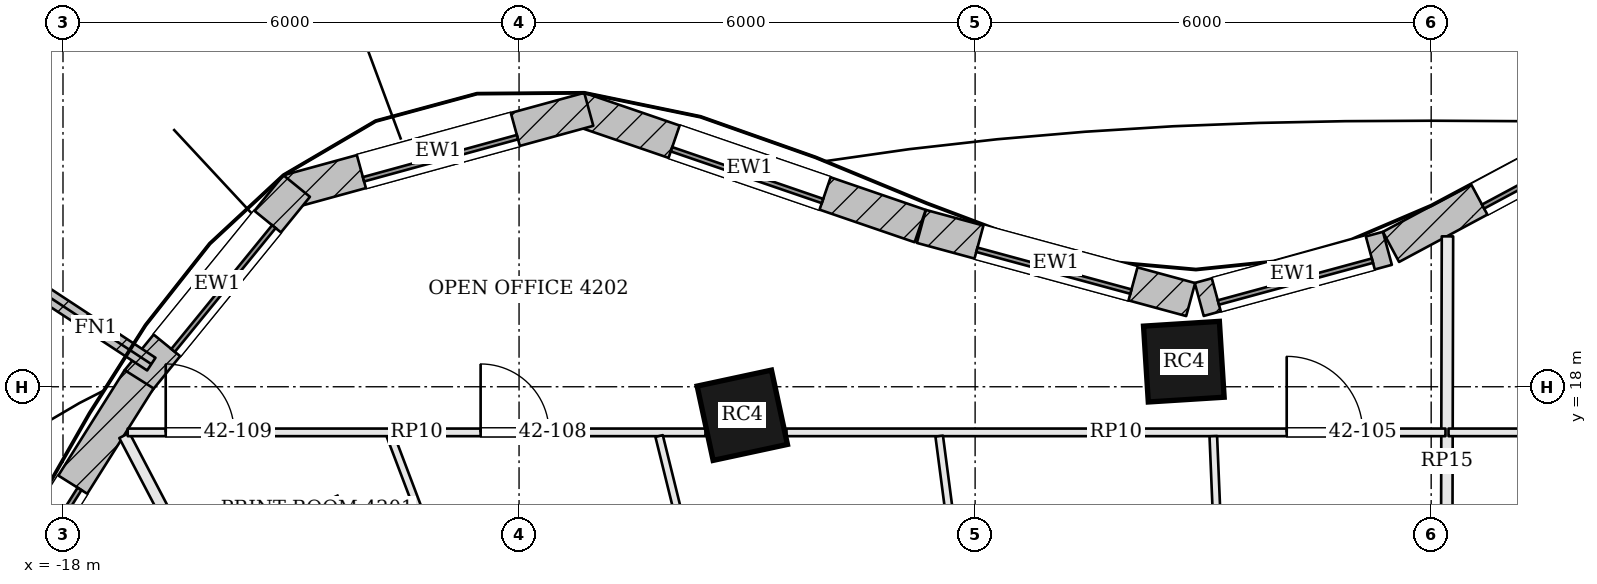
"""IFC4 building model, lengths in metres.
Left out: names, types, materials, properties, quantities, classifications, styles, units other than length and angle.
Written with IfcOpenShell. Run it as: python <this file> out.ifc"""

import sys

from ifc_helpers import new_model, si_unit, direction, frame, frame_2d, origin, origin_2d, place, context, subcontext, project, spatial, rectangle, extrude, element, fill, save


model = new_model("IFC4")
c1 = context("Model", 3, precision=1e-05, world=origin(), true_north=direction((0.0, 1.0)))
c2 = subcontext(c1, "Body", "Model", "MODEL_VIEW")
j1 = project(units=[si_unit("LENGTHUNIT", "METRE"), si_unit("PLANEANGLEUNIT", "RADIAN")], contexts=[c1])
p1 = place(None, origin())
s1 = spatial("IfcSite", under=j1, at=p1, CompositionType="ELEMENT")
p2 = place(p1, origin())
s2 = spatial("IfcBuilding", under=s1, at=p2, CompositionType="ELEMENT")
p3 = place(p2, frame((0.0, 0.0, 174.0)))
s3 = spatial("IfcBuildingStorey", under=s2, at=p3, CompositionType="ELEMENT", Elevation=174.0)
for number, where, z_axis, x_axis in (
    (1, (-3.254, 18.33, -0.7), (0.0, 0.0, 1.0), (-0.998, -0.063, 0.0)),
    (2, (-9.063, 17.625, -0.7), (0.0, 0.0, 1.0), (-0.978, -0.21, 0.0)),
    (3, (-14.643, 15.881, -0.7), (0.0, 0.0, 1.0), (-0.909, -0.417, 0.0)),
):
    element("IfcColumn", number, at=place(p3, frame(where, z_axis=z_axis, x_axis=x_axis)), inside=s3, PredefinedType="COLUMN", context=c2, shape_type="SweptSolid", body=[
        extrude(rectangle(XDim=1.0, YDim=1.0, at=origin_2d()), origin(), (0.0, 0.0, 1.0), 4.6),
    ])
p4 = place(p3, frame((3.646, 22.079, 0.0), z_axis=(0.0, 0.0, 1.0), x_axis=(-0.881279133897, -0.472596115259, 0.0)))
e4 = element("IfcWall", 4, at=p4, inside=s3, PredefinedType="SOLIDWALL", context=c2, shape_type="SweptSolid", body=[
    extrude(rectangle(XDim=4.737, YDim=0.45, at=frame_2d((2.368, 0.0))), origin(), (0.0, 0.0, 1.0), 3.7),
])
p5 = place(p4, frame((1.318, 0.0, 0.9)))
e5 = element("IfcOpeningElement", 5, at=p5, cuts=e4, PredefinedType="OPENING", context=c2, shape_type="SweptSolid", body=[
    extrude(rectangle(XDim=2.1, YDim=2.3, at=frame_2d((1.05, 1.15))), frame((0.0, 0.235, 0.0), z_axis=(0.0, -1.0, 0.0), x_axis=(1.0, 0.0, 0.0)), (0.0, 0.0, 1.0), 0.47),
])
p6 = place(p3, frame((-0.576, 19.821, 0.0), z_axis=(0.0, 0.0, 1.0), x_axis=(-0.965009398019, -0.262215296532, 0.0)))
e6 = element("IfcWall", 6, at=p6, inside=s3, PredefinedType="SOLIDWALL", context=c2, shape_type="SweptSolid", body=[
    extrude(rectangle(XDim=2.565, YDim=0.45, at=frame_2d((1.283, 0.0))), origin(), (0.0, 0.0, 1.0), 3.7),
])
p7 = place(p6, frame((0.233, 0.0, 0.9)))
e7 = element("IfcOpeningElement", 7, at=p7, cuts=e6, PredefinedType="OPENING", context=c2, shape_type="SweptSolid", body=[
    extrude(rectangle(XDim=2.1, YDim=2.3, at=frame_2d((1.05, 1.15))), frame((0.0, 0.235, 0.0), z_axis=(0.0, -1.0, 0.0), x_axis=(1.0, 0.0, 0.0)), (0.0, 0.0, 1.0), 0.47),
])
p8 = place(p3, frame((-3.164, 19.147, 0.0), z_axis=(0.0, 0.0, 1.0), x_axis=(-0.965039479998, 0.262104563191, 0.0)))
e8 = element("IfcWall", 8, at=p8, inside=s3, PredefinedType="SOLIDWALL", context=c2, shape_type="SweptSolid", body=[
    extrude(rectangle(XDim=3.672, YDim=0.45, at=frame_2d((1.836, 0.0))), origin(), (0.0, 0.0, 1.0), 3.7),
])
p9 = place(p8, frame((0.786, 0.0, 0.9)))
e9 = element("IfcOpeningElement", 9, at=p9, cuts=e8, PredefinedType="OPENING", context=c2, shape_type="SweptSolid", body=[
    extrude(rectangle(XDim=2.1, YDim=2.3, at=frame_2d((1.05, 1.15))), frame((0.0, 0.235, 0.0), z_axis=(0.0, -1.0, 0.0), x_axis=(1.0, 0.0, 0.0)), (0.0, 0.0, 1.0), 0.47),
])
p10 = place(p3, frame((-6.723, 20.114, 0.0), z_axis=(0.0, 0.0, 1.0), x_axis=(-0.945947299026, 0.324320377815, 0.0)))
e10 = element("IfcWall", 10, at=p10, inside=s3, PredefinedType="SOLIDWALL", context=c2, shape_type="SweptSolid", body=[
    extrude(rectangle(XDim=4.745, YDim=0.45, at=frame_2d((2.372, 0.0))), origin(), (0.0, 0.0, 1.0), 3.7),
])
p11 = place(p10, frame((1.322, 0.0, 0.9)))
e11 = element("IfcOpeningElement", 11, at=p11, cuts=e10, PredefinedType="OPENING", context=c2, shape_type="SweptSolid", body=[
    extrude(rectangle(XDim=2.1, YDim=2.3, at=frame_2d((1.05, 1.15))), frame((0.0, 0.235, 0.0), z_axis=(0.0, -1.0, 0.0), x_axis=(1.0, 0.0, 0.0)), (0.0, 0.0, 1.0), 0.47),
])
p12 = place(p3, frame((-11.083, 21.65, 0.0), z_axis=(0.0, 0.0, 1.0), x_axis=(-0.964483204983, -0.264144179011, 0.0)))
e12 = element("IfcWall", 12, at=p12, inside=s3, PredefinedType="SOLIDWALL", context=c2, shape_type="SweptSolid", body=[
    extrude(rectangle(XDim=4.104, YDim=0.45, at=frame_2d((2.052, 0.0))), origin(), (0.0, 0.0, 1.0), 3.7),
])
p13 = place(p12, frame((1.002, 0.0, 0.9)))
e13 = element("IfcOpeningElement", 13, at=p13, cuts=e12, PredefinedType="OPENING", context=c2, shape_type="SweptSolid", body=[
    extrude(rectangle(XDim=2.1, YDim=2.3, at=frame_2d((1.05, 1.15))), frame((0.0, 0.235, 0.0), z_axis=(0.0, -1.0, 0.0), x_axis=(1.0, 0.0, 0.0)), (0.0, 0.0, 1.0), 0.47),
])
p14 = place(p3, frame((-14.926, 20.641, 0.0), z_axis=(0.0, 0.0, 1.0), x_axis=(-0.631548074669, -0.775336720001, 0.0)))
e14 = element("IfcWall", 14, at=p14, inside=s3, PredefinedType="SOLIDWALL", context=c2, shape_type="SweptSolid", body=[
    extrude(rectangle(XDim=3.308, YDim=0.45, at=frame_2d((1.654, 0.0))), origin(), (0.0, 0.0, 1.0), 3.7),
])
p15 = place(p14, frame((0.604, 0.0, 0.9)))
e15 = element("IfcOpeningElement", 15, at=p15, cuts=e14, PredefinedType="OPENING", context=c2, shape_type="SweptSolid", body=[
    extrude(rectangle(XDim=2.1, YDim=2.3, at=frame_2d((1.05, 1.15))), frame((0.0, 0.235, 0.0), z_axis=(0.0, -1.0, 0.0), x_axis=(1.0, 0.0, 0.0)), (0.0, 0.0, 1.0), 0.47),
])
p16 = place(p3, frame((-16.998, 18.099, 0.0), z_axis=(0.0, 0.0, 1.0), x_axis=(-0.532745661304, -0.846275404559, 0.0)))
e16 = element("IfcWall", 16, at=p16, inside=s3, PredefinedType="SOLIDWALL", context=c2, shape_type="SweptSolid", body=[
    extrude(rectangle(XDim=5.076, YDim=0.45, at=frame_2d((2.538, 0.0))), origin(), (0.0, 0.0, 1.0), 3.7),
])
p17 = place(p16, frame((1.638, 0.0, 0.9)))
e17 = element("IfcOpeningElement", 17, at=p17, cuts=e16, PredefinedType="OPENING", context=c2, shape_type="SweptSolid", body=[
    extrude(rectangle(XDim=1.8, YDim=2.3, at=frame_2d((0.9, 1.15))), frame((0.0, 0.235, 0.0), z_axis=(0.0, -1.0, 0.0), x_axis=(1.0, 0.0, 0.0)), (0.0, 0.0, 1.0), 0.47),
])
p18 = place(p3, frame((-16.838, 18.298, 0.0), z_axis=(0.0, 0.0, 1.0), x_axis=(-0.835871900419, 0.548924554097, 0.0)))
e18 = element("IfcWall", 18, at=p18, inside=s3, PredefinedType="SOLIDWALL", context=c2, shape_type="SweptSolid", body=[
    extrude(rectangle(XDim=1.75, YDim=0.2, at=frame_2d((0.875, 0.0))), origin(), (0.0, 0.0, 1.0), 3.7),
])
p19 = place(p3, frame((0.214, 19.979, 0.0), z_axis=(0.0, 0.0, 1.0), x_axis=(-0.002357118586, -0.999997221992, 0.0)))
e19 = element("IfcWall", 19, at=p19, inside=s3, PredefinedType="PARTITIONING", context=c2, shape_type="SweptSolid", body=[
    extrude(rectangle(XDim=5.904, YDim=0.15, at=frame_2d((2.952, 0.0))), origin(), (0.0, 0.0, 1.0), 3.234),
])
p20 = place(p3, frame((-17.193, 17.36, 0.0), z_axis=(0.0, 0.0, 1.0), x_axis=(0.463995225493, -0.885837699988, 0.0)))
e20 = element("IfcWall", 20, at=p20, inside=s3, PredefinedType="PARTITIONING", context=c2, shape_type="SweptSolid", body=[
    extrude(rectangle(XDim=4.651, YDim=0.15, at=frame_2d((2.325, 0.0))), origin(), (0.0, 0.0, 1.0), 3.234),
])
p21 = place(p3, frame((0.228, 17.4, 0.0), z_axis=(0.0, 0.0, 1.0), x_axis=(1.0, 0.0, 0.0)))
e21 = element("IfcWall", 21, at=p21, inside=s3, PredefinedType="PARTITIONING", context=c2, shape_type="SweptSolid", body=[
    extrude(rectangle(XDim=7.596, YDim=0.1, at=frame_2d((3.798, 0.0))), origin(), (0.0, 0.0, 1.0), 3.084),
])
p22 = place(p21, frame((3.894, 0.0, 0.0)))
e22 = element("IfcOpeningElement", 22, at=p22, cuts=e21, PredefinedType="OPENING", context=c2, shape_type="SweptSolid", body=[
    extrude(rectangle(XDim=0.9, YDim=2.1, at=frame_2d((0.45, 1.05))), frame((0.0, 0.06, 0.0), z_axis=(0.0, -1.0, 0.0), x_axis=(1.0, 0.0, 0.0)), (0.0, 0.0, 1.0), 0.12),
])
p23 = place(p3, frame((-17.149, 17.4, 0.0), z_axis=(0.0, 0.0, 1.0), x_axis=(1.0, 0.0, 0.0)))
e23 = element("IfcWall", 23, at=p23, inside=s3, PredefinedType="PARTITIONING", context=c2, shape_type="SweptSolid", body=[
    extrude(rectangle(XDim=7.602, YDim=0.1, at=frame_2d((3.801, 0.0))), origin(), (0.0, 0.0, 1.0), 3.084),
])
p24 = place(p23, frame((4.643, 0.0, 0.0)))
e24 = element("IfcOpeningElement", 24, at=p24, cuts=e23, PredefinedType="OPENING", context=c2, shape_type="SweptSolid", body=[
    extrude(rectangle(XDim=0.9, YDim=2.1, at=frame_2d((0.45, 1.05))), frame((0.0, 0.06, 0.0), z_axis=(0.0, -1.0, 0.0), x_axis=(1.0, 0.0, 0.0)), (0.0, 0.0, 1.0), 0.12),
])
p25 = place(p23, frame((0.5, 0.0, 0.0)))
e25 = element("IfcOpeningElement", 25, at=p25, cuts=e23, PredefinedType="OPENING", context=c2, shape_type="SweptSolid", body=[
    extrude(rectangle(XDim=0.9, YDim=2.1, at=frame_2d((0.45, 1.05))), frame((0.0, 0.06, 0.0), z_axis=(0.0, -1.0, 0.0), x_axis=(1.0, 0.0, 0.0)), (0.0, 0.0, 1.0), 0.12),
])
p26 = place(p3, frame((-8.483, 17.4, 0.0), z_axis=(0.0, 0.0, 1.0), x_axis=(1.0, 0.0, 0.0)))
e26 = element("IfcWall", 26, at=p26, inside=s3, PredefinedType="PARTITIONING", context=c2, shape_type="SweptSolid", body=[
    extrude(rectangle(XDim=8.671, YDim=0.1, at=frame_2d((4.335, 0.0))), origin(), (0.0, 0.0, 1.0), 3.084),
])
p27 = place(p26, frame((6.582, 0.0, 0.0)))
e27 = element("IfcOpeningElement", 27, at=p27, cuts=e26, PredefinedType="OPENING", context=c2, shape_type="SweptSolid", body=[
    extrude(rectangle(XDim=1.0, YDim=2.1, at=frame_2d((0.5, 1.05))), frame((0.0, 0.06, 0.0), z_axis=(0.0, -1.0, 0.0), x_axis=(1.0, 0.0, 0.0)), (0.0, 0.0, 1.0), 0.12),
])
p28 = place(p3, frame((-2.729, 14.075, 0.0), z_axis=(0.0, 0.0, 1.0), x_axis=(-0.042005382394, 0.99911738442, 0.0)))
e28 = element("IfcWall", 28, at=p28, inside=s3, PredefinedType="PARTITIONING", context=c2, shape_type="SweptSolid", body=[
    extrude(rectangle(XDim=3.278, YDim=0.1, at=frame_2d((1.639, 0.0))), origin(), (0.0, 0.0, 1.0), 3.084),
])
p29 = place(p3, frame((-6.043, 14.074, 0.0), z_axis=(0.0, 0.0, 1.0), x_axis=(-0.12990779889, 0.991526078219, 0.0)))
e29 = element("IfcWall", 29, at=p29, inside=s3, PredefinedType="PARTITIONING", context=c2, shape_type="SweptSolid", body=[
    extrude(rectangle(XDim=3.304, YDim=0.1, at=frame_2d((1.652, 0.0))), origin(), (0.0, 0.0, 1.0), 3.084),
])
p30 = place(p3, frame((-9.347, 14.073, 0.0), z_axis=(0.0, 0.0, 1.0), x_axis=(-0.239847329474, 0.970810619299, 0.0)))
e30 = element("IfcWall", 30, at=p30, inside=s3, PredefinedType="PARTITIONING", context=c2, shape_type="SweptSolid", body=[
    extrude(rectangle(XDim=3.377, YDim=0.1, at=frame_2d((1.689, 0.0))), origin(), (0.0, 0.0, 1.0), 3.084),
])
p31 = place(p3, frame((-12.447, 14.07, 0.0), z_axis=(0.0, 0.0, 1.0), x_axis=(-0.354534757725, 0.935042836219, 0.0)))
e31 = element("IfcWall", 31, at=p31, inside=s3, PredefinedType="PARTITIONING", context=c2, shape_type="SweptSolid", body=[
    extrude(rectangle(XDim=3.511, YDim=0.1, at=frame_2d((1.756, 0.0))), origin(), (0.0, 0.0, 1.0), 3.084),
])
p32 = place(p5, origin())
e32 = element("IfcWindow", 32, at=p32, inside=s3, PartitioningType="SINGLE_PANEL", PredefinedType="WINDOW", context=c2, shape_type="SweptSolid", body=[
    extrude(rectangle(XDim=2.1, YDim=2.3, at=frame_2d((1.05, 1.15))), frame((0.0, 0.135, 0.0), z_axis=(0.0, -1.0, 0.0), x_axis=(1.0, 0.0, 0.0)), (0.0, 0.0, 1.0), 0.06),
])
fill(e5, e32)
p33 = place(p7, origin())
e33 = element("IfcWindow", 33, at=p33, inside=s3, PartitioningType="SINGLE_PANEL", PredefinedType="WINDOW", context=c2, shape_type="SweptSolid", body=[
    extrude(rectangle(XDim=2.1, YDim=2.3, at=frame_2d((1.05, 1.15))), frame((0.0, 0.135, 0.0), z_axis=(0.0, -1.0, 0.0), x_axis=(1.0, 0.0, 0.0)), (0.0, 0.0, 1.0), 0.06),
])
fill(e7, e33)
p34 = place(p9, origin())
e34 = element("IfcWindow", 34, at=p34, inside=s3, PartitioningType="SINGLE_PANEL", PredefinedType="WINDOW", context=c2, shape_type="SweptSolid", body=[
    extrude(rectangle(XDim=2.1, YDim=2.3, at=frame_2d((1.05, 1.15))), frame((0.0, 0.135, 0.0), z_axis=(0.0, -1.0, 0.0), x_axis=(1.0, 0.0, 0.0)), (0.0, 0.0, 1.0), 0.06),
])
fill(e9, e34)
p35 = place(p11, origin())
e35 = element("IfcWindow", 35, at=p35, inside=s3, PartitioningType="SINGLE_PANEL", PredefinedType="WINDOW", context=c2, shape_type="SweptSolid", body=[
    extrude(rectangle(XDim=2.1, YDim=2.3, at=frame_2d((1.05, 1.15))), frame((0.0, 0.135, 0.0), z_axis=(0.0, -1.0, 0.0), x_axis=(1.0, 0.0, 0.0)), (0.0, 0.0, 1.0), 0.06),
])
fill(e11, e35)
p36 = place(p13, origin())
e36 = element("IfcWindow", 36, at=p36, inside=s3, PartitioningType="SINGLE_PANEL", PredefinedType="WINDOW", context=c2, shape_type="SweptSolid", body=[
    extrude(rectangle(XDim=2.1, YDim=2.3, at=frame_2d((1.05, 1.15))), frame((0.0, 0.135, 0.0), z_axis=(0.0, -1.0, 0.0), x_axis=(1.0, 0.0, 0.0)), (0.0, 0.0, 1.0), 0.06),
])
fill(e13, e36)
p37 = place(p15, origin())
e37 = element("IfcWindow", 37, at=p37, inside=s3, PartitioningType="SINGLE_PANEL", PredefinedType="WINDOW", context=c2, shape_type="SweptSolid", body=[
    extrude(rectangle(XDim=2.1, YDim=2.3, at=frame_2d((1.05, 1.15))), frame((0.0, 0.135, 0.0), z_axis=(0.0, -1.0, 0.0), x_axis=(1.0, 0.0, 0.0)), (0.0, 0.0, 1.0), 0.06),
])
fill(e15, e37)
p38 = place(p17, origin())
e38 = element("IfcWindow", 38, at=p38, inside=s3, PartitioningType="SINGLE_PANEL", PredefinedType="WINDOW", context=c2, shape_type="SweptSolid", body=[
    extrude(rectangle(XDim=1.8, YDim=2.3, at=frame_2d((0.9, 1.15))), frame((0.0, 0.135, 0.0), z_axis=(0.0, -1.0, 0.0), x_axis=(1.0, 0.0, 0.0)), (0.0, 0.0, 1.0), 0.06),
])
fill(e17, e38)
p39 = place(p27, origin())
e39 = element("IfcDoor", 39, at=p39, inside=s3, OperationType="SINGLE_SWING_LEFT", PredefinedType="DOOR", context=c2, shape_type="SweptSolid", body=[
    extrude(rectangle(XDim=1.0, YDim=2.1, at=frame_2d((0.5, 1.05))), frame((0.0, 0.025, 0.0), z_axis=(0.0, -1.0, 0.0), x_axis=(1.0, 0.0, 0.0)), (0.0, 0.0, 1.0), 0.05),
])
fill(e27, e39)
p40 = place(p24, origin())
e40 = element("IfcDoor", 40, at=p40, inside=s3, OperationType="SINGLE_SWING_LEFT", PredefinedType="DOOR", context=c2, shape_type="SweptSolid", body=[
    extrude(rectangle(XDim=0.9, YDim=2.1, at=frame_2d((0.45, 1.05))), frame((0.0, 0.025, 0.0), z_axis=(0.0, -1.0, 0.0), x_axis=(1.0, 0.0, 0.0)), (0.0, 0.0, 1.0), 0.05),
])
fill(e24, e40)
p41 = place(p25, origin())
e41 = element("IfcDoor", 41, at=p41, inside=s3, OperationType="SINGLE_SWING_LEFT", PredefinedType="DOOR", context=c2, shape_type="SweptSolid", body=[
    extrude(rectangle(XDim=0.9, YDim=2.1, at=frame_2d((0.45, 1.05))), frame((0.0, 0.025, 0.0), z_axis=(0.0, -1.0, 0.0), x_axis=(1.0, 0.0, 0.0)), (0.0, 0.0, 1.0), 0.05),
])
fill(e25, e41)
save(model, sys.argv[1])
